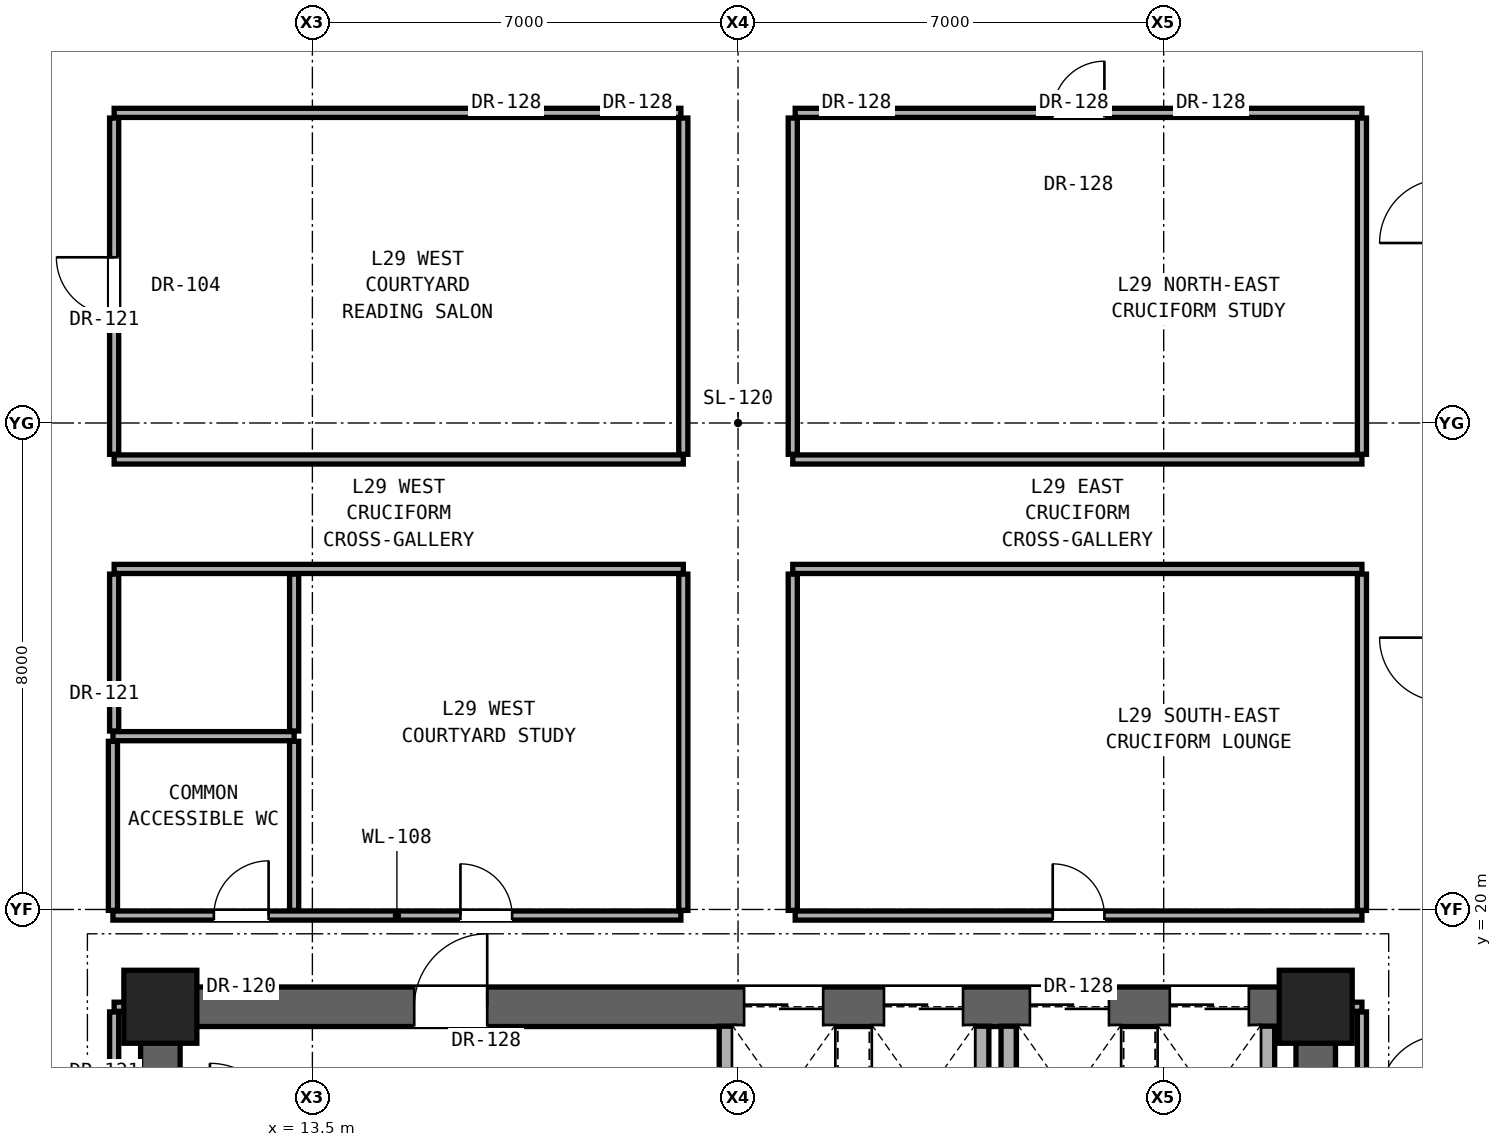
"""IFC4 building model, lengths in metres.
Left out: names, types, materials, properties, quantities, classifications, styles, units other than length and angle.
Written with IfcOpenShell. Run it as: python <this file> out.ifc"""

import sys

from ifc_helpers import new_model, si_unit, direction, frame, frame_2d, origin, origin_2d, place, context, subcontext, project, spatial, rectangle, extrude, element, fill, save


model = new_model("IFC4")
c1 = context("Model", 3, precision=1e-05, world=origin(), true_north=direction((0.0, 1.0)))
c2 = subcontext(c1, "Body", "Model", "MODEL_VIEW")
j1 = project(units=[si_unit("LENGTHUNIT", "METRE"), si_unit("PLANEANGLEUNIT", "RADIAN")], contexts=[c1])
p1 = place(None, origin())
s1 = spatial("IfcSite", under=j1, at=p1, CompositionType="ELEMENT")
p2 = place(p1, origin())
s2 = spatial("IfcBuilding", under=s1, at=p2, CompositionType="ELEMENT")
p3 = place(p2, frame((0.0, 0.0, 104.9)))
s3 = spatial("IfcBuildingStorey", under=s2, at=p3, CompositionType="ELEMENT", Elevation=104.9)
for number, where, z_axis, x_axis in (
    (1, (11.0, 18.4, 0.0), (0.0, 0.0, 1.0), (1.0, 0.0, 0.0)),
    (2, (30.0, 18.4, 0.0), (0.0, 0.0, 1.0), (1.0, 0.0, 0.0)),
):
    element("IfcColumn", number, at=place(p3, frame(where, z_axis=z_axis, x_axis=x_axis)), inside=s3, PredefinedType="COLUMN", context=c2, shape_type="SweptSolid", body=[
        extrude(rectangle(XDim=1.2, YDim=1.2, at=origin_2d()), origin(), (0.0, 0.0, 1.0), 3.3),
    ])
for number, where, z_axis, x_axis in (
    (3, (11.0, 12.4, 0.0), (0.0, 0.0, 1.0), (0.0, 1.0, 0.0)),
    (4, (30.0, 12.4, 0.0), (0.0, 0.0, 1.0), (0.0, 1.0, 0.0)),
):
    element("IfcWall", number, at=place(p3, frame(where, z_axis=z_axis, x_axis=x_axis)), inside=s3, PredefinedType="SHEAR", context=c2, shape_type="SweptSolid", body=[
        extrude(rectangle(XDim=6.0, YDim=0.65, at=frame_2d((3.0, 0.0))), origin(), (0.0, 0.0, 1.0), 3.08),
    ])
p4 = place(p3, frame((11.0, 18.4, 0.0), z_axis=(0.0, 0.0, 1.0), x_axis=(1.0, 0.0, 0.0)))
e5 = element("IfcWall", 5, at=p4, inside=s3, PredefinedType="SHEAR", context=c2, shape_type="SweptSolid", body=[
    extrude(rectangle(XDim=19.0, YDim=0.65, at=frame_2d((9.5, 0.0))), origin(), (0.0, 0.0, 1.0), 3.08),
])
p5 = place(p4, frame((4.175, 0.0, 0.0)))
e6 = element("IfcOpeningElement", 6, at=p5, cuts=e5, PredefinedType="OPENING", context=c2, shape_type="SweptSolid", body=[
    extrude(rectangle(XDim=1.2, YDim=2.25, at=frame_2d((0.6, 1.125))), frame((0.0, 0.335, 0.0), z_axis=(0.0, -1.0, 0.0), x_axis=(1.0, 0.0, 0.0)), (0.0, 0.0, 1.0), 0.67),
])
p6 = place(p4, frame((9.6, 0.0, 0.0)))
e7 = element("IfcOpeningElement", 7, at=p6, cuts=e5, PredefinedType="OPENING", context=c2, shape_type="SweptSolid", body=[
    extrude(rectangle(XDim=1.3, YDim=2.3, at=frame_2d((0.65, 1.15))), frame((0.0, 0.335, 0.0), z_axis=(0.0, -1.0, 0.0), x_axis=(1.0, 0.0, 0.0)), (0.0, 0.0, 1.0), 0.67),
])
p7 = place(p4, frame((11.9, 0.0, 0.0)))
e8 = element("IfcOpeningElement", 8, at=p7, cuts=e5, PredefinedType="OPENING", context=c2, shape_type="SweptSolid", body=[
    extrude(rectangle(XDim=1.3, YDim=2.3, at=frame_2d((0.65, 1.15))), frame((0.0, 0.335, 0.0), z_axis=(0.0, -1.0, 0.0), x_axis=(1.0, 0.0, 0.0)), (0.0, 0.0, 1.0), 0.67),
])
p8 = place(p4, frame((14.3, 0.0, 0.0)))
e9 = element("IfcOpeningElement", 9, at=p8, cuts=e5, PredefinedType="OPENING", context=c2, shape_type="SweptSolid", body=[
    extrude(rectangle(XDim=1.3, YDim=2.3, at=frame_2d((0.65, 1.15))), frame((0.0, 0.335, 0.0), z_axis=(0.0, -1.0, 0.0), x_axis=(1.0, 0.0, 0.0)), (0.0, 0.0, 1.0), 0.67),
])
p9 = place(p4, frame((16.6, 0.0, 0.0)))
e10 = element("IfcOpeningElement", 10, at=p9, cuts=e5, PredefinedType="OPENING", context=c2, shape_type="SweptSolid", body=[
    extrude(rectangle(XDim=1.3, YDim=2.3, at=frame_2d((0.65, 1.15))), frame((0.0, 0.335, 0.0), z_axis=(0.0, -1.0, 0.0), x_axis=(1.0, 0.0, 0.0)), (0.0, 0.0, 1.0), 0.67),
])
for number, where, z_axis, x_axis in (
    (11, (10.24, 18.4, 0.0), (0.0, 0.0, 1.0), (1.0, 0.0, 0.0)),
    (12, (30.32, 18.4, 0.0), (0.0, 0.0, 1.0), (1.0, 0.0, 0.0)),
):
    element("IfcWall", number, at=place(p3, frame(where, z_axis=z_axis, x_axis=x_axis)), inside=s3, PredefinedType="PARTITIONING", context=c2, shape_type="SweptSolid", body=[
        extrude(rectangle(XDim=0.44, YDim=0.15, at=frame_2d((0.22, 0.0))), origin(), (0.0, 0.0, 1.0), 2.456),
    ])
p10 = place(p3, frame((10.22, 19.9, 0.0), z_axis=(0.0, 0.0, 1.0), x_axis=(1.0, 0.0, 0.0)))
e13 = element("IfcWall", 13, at=p10, inside=s3, PredefinedType="PARTITIONING", context=c2, shape_type="SweptSolid", body=[
    extrude(rectangle(XDim=9.34, YDim=0.15, at=frame_2d((4.67, 0.0))), origin(), (0.0, 0.0, 1.0), 2.124),
])
p11 = place(p10, frame((1.66, 0.0, 0.0)))
e14 = element("IfcOpeningElement", 14, at=p11, cuts=e13, PredefinedType="OPENING", context=c2, shape_type="SweptSolid", body=[
    extrude(rectangle(XDim=0.9, YDim=2.1, at=frame_2d((0.45, 1.05))), frame((0.0, 0.085, 0.0), z_axis=(0.0, -1.0, 0.0), x_axis=(1.0, 0.0, 0.0)), (0.0, 0.0, 1.0), 0.17),
])
p12 = place(p10, frame((5.715, 0.0, 0.0)))
e15 = element("IfcOpeningElement", 15, at=p12, cuts=e13, PredefinedType="OPENING", context=c2, shape_type="SweptSolid", body=[
    extrude(rectangle(XDim=0.85, YDim=2.01, at=frame_2d((0.425, 1.005))), frame((0.0, 0.085, 0.0), z_axis=(0.0, -1.0, 0.0), x_axis=(1.0, 0.0, 0.0)), (0.0, 0.0, 1.0), 0.17),
])
p13 = place(p3, frame((21.44, 19.9, 0.0), z_axis=(0.0, 0.0, 1.0), x_axis=(1.0, 0.0, 0.0)))
e16 = element("IfcWall", 16, at=p13, inside=s3, PredefinedType="PARTITIONING", context=c2, shape_type="SweptSolid", body=[
    extrude(rectangle(XDim=9.32, YDim=0.15, at=frame_2d((4.66, 0.0))), origin(), (0.0, 0.0, 1.0), 2.124),
])
p14 = place(p13, frame((4.235, 0.0, 0.0)))
e17 = element("IfcOpeningElement", 17, at=p14, cuts=e16, PredefinedType="OPENING", context=c2, shape_type="SweptSolid", body=[
    extrude(rectangle(XDim=0.85, YDim=2.01, at=frame_2d((0.425, 1.005))), frame((0.0, 0.085, 0.0), z_axis=(0.0, -1.0, 0.0), x_axis=(1.0, 0.0, 0.0)), (0.0, 0.0, 1.0), 0.17),
])
p15 = place(p3, frame((10.22, 22.85, 0.0), z_axis=(0.0, 0.0, 1.0), x_axis=(1.0, 0.0, 0.0)))
e18 = element("IfcWall", 18, at=p15, inside=s3, PredefinedType="PARTITIONING", context=c2, shape_type="SweptSolid", body=[
    extrude(rectangle(XDim=2.98, YDim=0.15, at=frame_2d((1.49, 0.0))), origin(), (0.0, 0.0, 1.0), 2.124),
])
for number, where, z_axis, x_axis in (
    (19, (10.24, 25.6, 0.0), (0.0, 0.0, 1.0), (1.0, 0.0, 0.0)),
    (20, (21.4, 25.6, 0.0), (0.0, 0.0, 1.0), (1.0, 0.0, 0.0)),
    (21, (10.24, 27.4, 0.0), (0.0, 0.0, 1.0), (1.0, 0.0, 0.0)),
    (22, (21.4, 27.4, 0.0), (0.0, 0.0, 1.0), (1.0, 0.0, 0.0)),
):
    element("IfcWall", number, at=place(p3, frame(where, z_axis=z_axis, x_axis=x_axis)), inside=s3, PredefinedType="PARTITIONING", context=c2, shape_type="SweptSolid", body=[
        extrude(rectangle(XDim=9.36, YDim=0.15, at=frame_2d((4.68, 0.0))), origin(), (0.0, 0.0, 1.0), 2.124),
    ])
p16 = place(p3, frame((10.24, 33.1, 0.0), z_axis=(0.0, 0.0, 1.0), x_axis=(1.0, 0.0, 0.0)))
e23 = element("IfcWall", 23, at=p16, inside=s3, PredefinedType="PARTITIONING", context=c2, shape_type="SweptSolid", body=[
    extrude(rectangle(XDim=9.32, YDim=0.15, at=frame_2d((4.66, 0.0))), origin(), (0.0, 0.0, 1.0), 2.124),
])
p17 = place(p3, frame((21.44, 33.1, 0.0), z_axis=(0.0, 0.0, 1.0), x_axis=(1.0, 0.0, 0.0)))
e24 = element("IfcWall", 24, at=p17, inside=s3, PredefinedType="PARTITIONING", context=c2, shape_type="SweptSolid", body=[
    extrude(rectangle(XDim=9.32, YDim=0.15, at=frame_2d((4.66, 0.0))), origin(), (0.0, 0.0, 1.0), 2.124),
])
p18 = place(p17, frame((4.235, 0.0, 0.0)))
e25 = element("IfcOpeningElement", 25, at=p18, cuts=e24, PredefinedType="OPENING", context=c2, shape_type="SweptSolid", body=[
    extrude(rectangle(XDim=0.85, YDim=2.01, at=frame_2d((0.425, 1.005))), frame((0.0, 0.085, 0.0), z_axis=(0.0, -1.0, 0.0), x_axis=(1.0, 0.0, 0.0)), (0.0, 0.0, 1.0), 0.17),
])
p19 = place(p3, frame((10.22, 19.985, 0.0), z_axis=(0.0, 0.0, 1.0), x_axis=(0.0, 1.0, 0.0)))
e26 = element("IfcWall", 26, at=p19, inside=s3, PredefinedType="PARTITIONING", context=c2, shape_type="SweptSolid", body=[
    extrude(rectangle(XDim=2.78, YDim=0.15, at=frame_2d((1.39, 0.0))), origin(), (0.0, 0.0, 1.0), 3.08),
])
p20 = place(p3, frame((10.24, 12.335, 0.0), z_axis=(0.0, 0.0, 1.0), x_axis=(0.0, 1.0, 0.0)))
e27 = element("IfcWall", 27, at=p20, inside=s3, PredefinedType="PARTITIONING", context=c2, shape_type="SweptSolid", body=[
    extrude(rectangle(XDim=5.98, YDim=0.15, at=frame_2d((2.99, 0.0))), origin(), (0.0, 0.0, 1.0), 2.456),
])
p21 = place(p3, frame((10.24, 22.935, 0.0), z_axis=(0.0, 0.0, 1.0), x_axis=(0.0, 1.0, 0.0)))
e28 = element("IfcWall", 28, at=p21, inside=s3, PredefinedType="PARTITIONING", context=c2, shape_type="SweptSolid", body=[
    extrude(rectangle(XDim=2.58, YDim=0.15, at=frame_2d((1.29, 0.0))), origin(), (0.0, 0.0, 1.0), 2.299),
])
p22 = place(p3, frame((10.24, 27.485, 0.0), z_axis=(0.0, 0.0, 1.0), x_axis=(0.0, 1.0, 0.0)))
e29 = element("IfcWall", 29, at=p22, inside=s3, PredefinedType="PARTITIONING", context=c2, shape_type="SweptSolid", body=[
    extrude(rectangle(XDim=5.53, YDim=0.15, at=frame_2d((2.765, 0.0))), origin(), (0.0, 0.0, 1.0), 2.299),
])
p23 = place(p22, frame((2.29, 0.0, 0.0)))
e30 = element("IfcOpeningElement", 30, at=p23, cuts=e29, PredefinedType="OPENING", context=c2, shape_type="SweptSolid", body=[
    extrude(rectangle(XDim=0.95, YDim=2.15, at=frame_2d((0.475, 1.075))), frame((0.0, 0.085, 0.0), z_axis=(0.0, -1.0, 0.0), x_axis=(1.0, 0.0, 0.0)), (0.0, 0.0, 1.0), 0.17),
])
p24 = place(p3, frame((13.2, 19.985, 0.0), z_axis=(0.0, 0.0, 1.0), x_axis=(0.0, 1.0, 0.0)))
e31 = element("IfcWall", 31, at=p24, inside=s3, PredefinedType="PARTITIONING", context=c2, shape_type="SweptSolid", body=[
    extrude(rectangle(XDim=2.78, YDim=0.15, at=frame_2d((1.39, 0.0))), origin(), (0.0, 0.0, 1.0), 3.08),
])
p25 = place(p3, frame((13.2, 22.935, 0.0), z_axis=(0.0, 0.0, 1.0), x_axis=(0.0, 1.0, 0.0)))
e32 = element("IfcWall", 32, at=p25, inside=s3, PredefinedType="PARTITIONING", context=c2, shape_type="SweptSolid", body=[
    extrude(rectangle(XDim=2.58, YDim=0.15, at=frame_2d((1.29, 0.0))), origin(), (0.0, 0.0, 1.0), 2.124),
])
for number, where, z_axis, x_axis in (
    (33, (19.6, 19.985, 0.0), (0.0, 0.0, 1.0), (0.0, 1.0, 0.0)),
    (34, (19.6, 27.485, 0.0), (0.0, 0.0, 1.0), (0.0, 1.0, 0.0)),
):
    element("IfcWall", number, at=place(p3, frame(where, z_axis=z_axis, x_axis=x_axis)), inside=s3, PredefinedType="PARTITIONING", context=c2, shape_type="SweptSolid", body=[
        extrude(rectangle(XDim=5.53, YDim=0.15, at=frame_2d((2.765, 0.0))), origin(), (0.0, 0.0, 1.0), 2.124),
    ])
p26 = place(p3, frame((20.315, 16.555, 0.0), z_axis=(0.0, 0.0, 1.0), x_axis=(0.0, 1.0, 0.0)))
e35 = element("IfcWall", 35, at=p26, inside=s3, PredefinedType="SOLIDWALL", context=c2, shape_type="SweptSolid", body=[
    extrude(rectangle(XDim=1.525, YDim=0.25, at=frame_2d((0.763, 0.0))), origin(), (0.0, 0.0, 1.0), 3.08),
])
for number, where, z_axis, x_axis in (
    (36, (21.4, 19.985, 0.0), (0.0, 0.0, 1.0), (0.0, 1.0, 0.0)),
    (37, (21.4, 27.485, 0.0), (0.0, 0.0, 1.0), (0.0, 1.0, 0.0)),
):
    element("IfcWall", number, at=place(p3, frame(where, z_axis=z_axis, x_axis=x_axis)), inside=s3, PredefinedType="PARTITIONING", context=c2, shape_type="SweptSolid", body=[
        extrude(rectangle(XDim=5.53, YDim=0.15, at=frame_2d((2.765, 0.0))), origin(), (0.0, 0.0, 1.0), 2.124),
    ])
for number, where, z_axis, x_axis in (
    (38, (24.5, 15.785, 0.0), (0.0, 0.0, 1.0), (0.0, 1.0, 0.0)),
    (39, (24.95, 15.785, 0.0), (0.0, 0.0, 1.0), (0.0, 1.0, 0.0)),
    (40, (29.2, 15.785, 0.0), (0.0, 0.0, 1.0), (0.0, 1.0, 0.0)),
):
    element("IfcWall", number, at=place(p3, frame(where, z_axis=z_axis, x_axis=x_axis)), inside=s3, PredefinedType="SOLIDWALL", context=c2, shape_type="SweptSolid", body=[
        extrude(rectangle(XDim=2.295, YDim=0.25, at=frame_2d((1.147, 0.0))), origin(), (0.0, 0.0, 1.0), 3.08),
    ])
p27 = place(p3, frame((30.76, 12.335, 0.0), z_axis=(0.0, 0.0, 1.0), x_axis=(0.0, 1.0, 0.0)))
e41 = element("IfcWall", 41, at=p27, inside=s3, PredefinedType="PARTITIONING", context=c2, shape_type="SweptSolid", body=[
    extrude(rectangle(XDim=5.98, YDim=0.15, at=frame_2d((2.99, 0.0))), origin(), (0.0, 0.0, 1.0), 2.456),
])
for number, where, z_axis, x_axis in (
    (42, (30.76, 19.985, 0.0), (0.0, 0.0, 1.0), (0.0, 1.0, 0.0)),
    (43, (30.76, 27.485, 0.0), (0.0, 0.0, 1.0), (0.0, 1.0, 0.0)),
):
    element("IfcWall", number, at=place(p3, frame(where, z_axis=z_axis, x_axis=x_axis)), inside=s3, PredefinedType="PARTITIONING", context=c2, shape_type="SweptSolid", body=[
        extrude(rectangle(XDim=5.53, YDim=0.15, at=frame_2d((2.765, 0.0))), origin(), (0.0, 0.0, 1.0), 2.299),
    ])
p28 = place(p5, origin())
e44 = element("IfcDoor", 44, at=p28, inside=s3, OperationType="SINGLE_SWING_RIGHT", PredefinedType="DOOR", context=c2, shape_type="SweptSolid", body=[
    extrude(rectangle(XDim=1.2, YDim=2.25, at=frame_2d((0.6, 1.125))), frame((0.0, 0.025, 0.0), z_axis=(0.0, -1.0, 0.0), x_axis=(1.0, 0.0, 0.0)), (0.0, 0.0, 1.0), 0.05),
])
fill(e6, e44)
p29 = place(p11, origin())
e45 = element("IfcDoor", 45, at=p29, inside=s3, OperationType="SINGLE_SWING_RIGHT", PredefinedType="DOOR", context=c2, shape_type="SweptSolid", body=[
    extrude(rectangle(XDim=0.9, YDim=2.1, at=frame_2d((0.45, 1.05))), frame((0.0, 0.025, 0.0), z_axis=(0.0, -1.0, 0.0), x_axis=(1.0, 0.0, 0.0)), (0.0, 0.0, 1.0), 0.05),
])
fill(e14, e45)
p30 = place(p12, origin())
e46 = element("IfcDoor", 46, at=p30, inside=s3, OperationType="SINGLE_SWING_LEFT", PredefinedType="DOOR", context=c2, shape_type="SweptSolid", body=[
    extrude(rectangle(XDim=0.85, YDim=2.01, at=frame_2d((0.425, 1.005))), frame((0.0, 0.025, 0.0), z_axis=(0.0, -1.0, 0.0), x_axis=(1.0, 0.0, 0.0)), (0.0, 0.0, 1.0), 0.05),
])
fill(e15, e46)
p31 = place(p23, origin())
e47 = element("IfcDoor", 47, at=p31, inside=s3, OperationType="SINGLE_SWING_RIGHT", PredefinedType="DOOR", context=c2, shape_type="SweptSolid", body=[
    extrude(rectangle(XDim=0.95, YDim=2.15, at=frame_2d((0.475, 1.075))), frame((0.0, 0.025, 0.0), z_axis=(0.0, -1.0, 0.0), x_axis=(1.0, 0.0, 0.0)), (0.0, 0.0, 1.0), 0.05),
])
fill(e30, e47)
p32 = place(p14, origin())
e48 = element("IfcDoor", 48, at=p32, inside=s3, OperationType="SINGLE_SWING_LEFT", PredefinedType="DOOR", context=c2, shape_type="SweptSolid", body=[
    extrude(rectangle(XDim=0.85, YDim=2.01, at=frame_2d((0.425, 1.005))), frame((0.0, 0.025, 0.0), z_axis=(0.0, -1.0, 0.0), x_axis=(1.0, 0.0, 0.0)), (0.0, 0.0, 1.0), 0.05),
])
fill(e17, e48)
p33 = place(p18, origin())
e49 = element("IfcDoor", 49, at=p33, inside=s3, OperationType="SINGLE_SWING_RIGHT", PredefinedType="DOOR", context=c2, shape_type="SweptSolid", body=[
    extrude(rectangle(XDim=0.85, YDim=2.01, at=frame_2d((0.425, 1.005))), frame((0.0, 0.025, 0.0), z_axis=(0.0, -1.0, 0.0), x_axis=(1.0, 0.0, 0.0)), (0.0, 0.0, 1.0), 0.05),
])
fill(e25, e49)
p34 = place(p6, origin())
e50 = element("IfcDoor", 50, at=p34, inside=s3, OperationType="DOUBLE_DOOR_SLIDING", PredefinedType="DOOR", context=c2, shape_type="SweptSolid", body=[
    extrude(rectangle(XDim=1.3, YDim=2.3, at=frame_2d((0.65, 1.15))), frame((0.0, 0.025, 0.0), z_axis=(0.0, -1.0, 0.0), x_axis=(1.0, 0.0, 0.0)), (0.0, 0.0, 1.0), 0.05),
])
fill(e7, e50)
p35 = place(p7, origin())
e51 = element("IfcDoor", 51, at=p35, inside=s3, OperationType="DOUBLE_DOOR_SLIDING", PredefinedType="DOOR", context=c2, shape_type="SweptSolid", body=[
    extrude(rectangle(XDim=1.3, YDim=2.3, at=frame_2d((0.65, 1.15))), frame((0.0, 0.025, 0.0), z_axis=(0.0, -1.0, 0.0), x_axis=(1.0, 0.0, 0.0)), (0.0, 0.0, 1.0), 0.05),
])
fill(e8, e51)
p36 = place(p8, origin())
e52 = element("IfcDoor", 52, at=p36, inside=s3, OperationType="DOUBLE_DOOR_SLIDING", PredefinedType="DOOR", context=c2, shape_type="SweptSolid", body=[
    extrude(rectangle(XDim=1.3, YDim=2.3, at=frame_2d((0.65, 1.15))), frame((0.0, 0.025, 0.0), z_axis=(0.0, -1.0, 0.0), x_axis=(1.0, 0.0, 0.0)), (0.0, 0.0, 1.0), 0.05),
])
fill(e9, e52)
p37 = place(p9, origin())
e53 = element("IfcDoor", 53, at=p37, inside=s3, OperationType="DOUBLE_DOOR_SLIDING", PredefinedType="DOOR", context=c2, shape_type="SweptSolid", body=[
    extrude(rectangle(XDim=1.3, YDim=2.3, at=frame_2d((0.65, 1.15))), frame((0.0, 0.025, 0.0), z_axis=(0.0, -1.0, 0.0), x_axis=(1.0, 0.0, 0.0)), (0.0, 0.0, 1.0), 0.05),
])
fill(e10, e53)
save(model, sys.argv[1])
